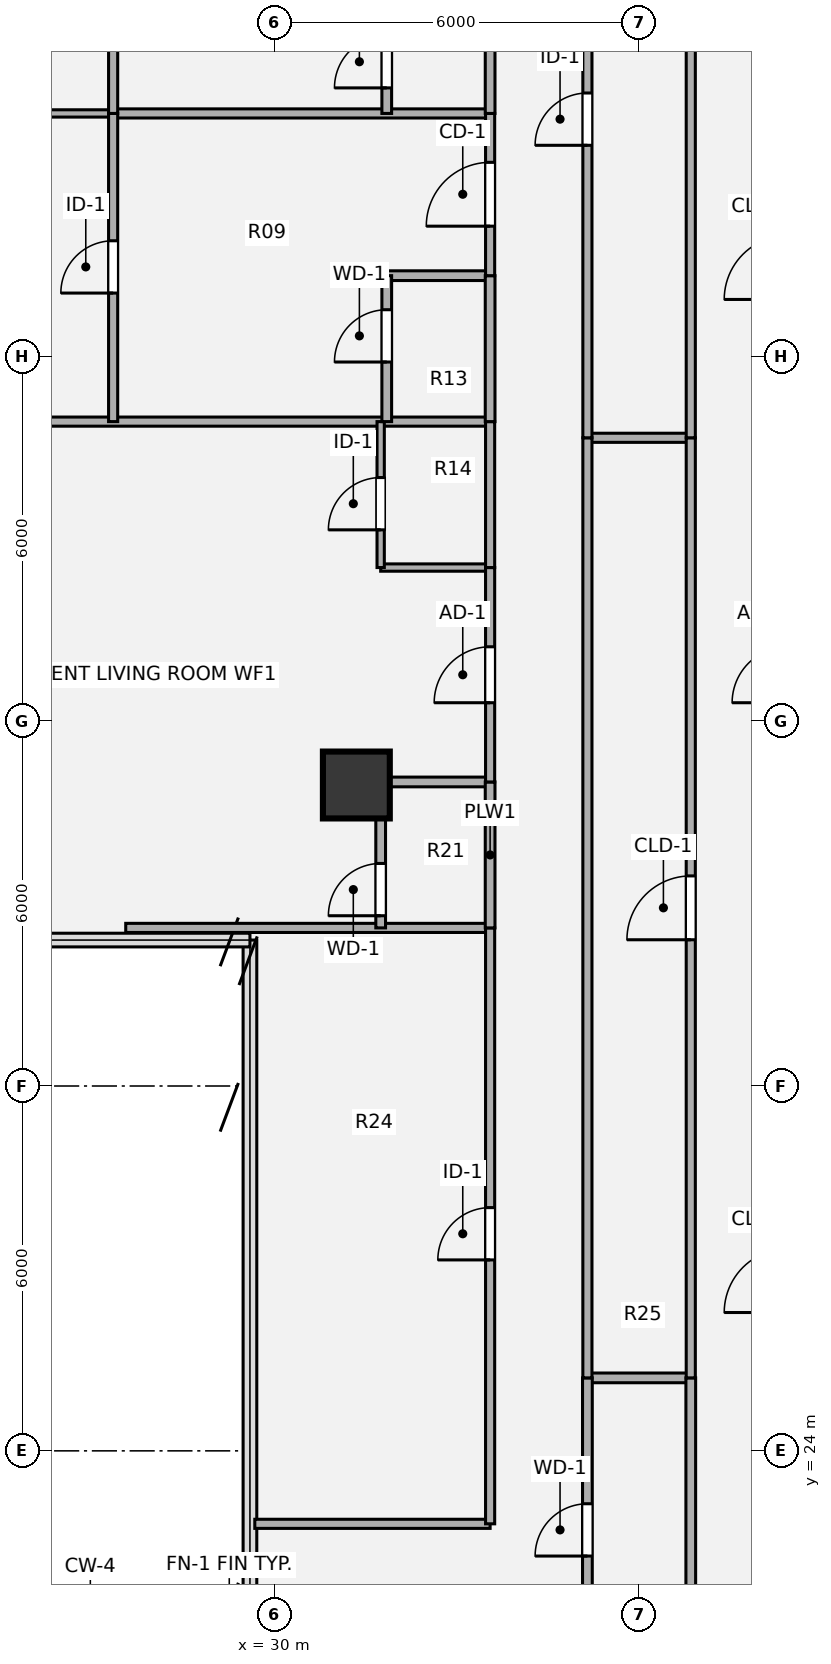
"""IFC4 building model, lengths in metres.
Left out: names, types, materials, properties, quantities, classifications, styles, units other than length and angle.
Written with IfcOpenShell. Run it as: python <this file> out.ifc"""

import sys

from ifc_helpers import new_model, si_unit, direction, frame, frame_2d, origin, origin_2d, place, context, subcontext, project, spatial, rectangle, hollow_circle, extrude, source, transform, mapped, element, fill, save


model = new_model("IFC4")
c1 = context("Model", 3, precision=1e-05, world=origin(), true_north=direction((0.0, 1.0)))
c2 = subcontext(c1, "Body", "Model", "MODEL_VIEW")
j1 = project(units=[si_unit("LENGTHUNIT", "METRE"), si_unit("PLANEANGLEUNIT", "RADIAN")], contexts=[c1])
p1 = place(None, origin())
s1 = spatial("IfcSite", under=j1, at=p1, CompositionType="ELEMENT")
p2 = place(p1, origin())
s2 = spatial("IfcBuilding", under=s1, at=p2, CompositionType="ELEMENT")
p3 = place(p2, frame((0.0, 0.0, 209.34)))
s3 = spatial("IfcBuildingStorey", under=s2, at=p3, CompositionType="ELEMENT", Elevation=209.34)
m1 = source(origin(), c2, "Body", "SweptSolid", [
    extrude(hollow_circle(Radius=0.55, WallThickness=0.04, at=origin_2d()), origin(), (0.0, 0.0, 1.0), 3.372),
])
p4 = place(p3, frame((31.35, 34.95, 0.0), z_axis=(0.0, 0.0, 1.0), x_axis=(1.0, 0.0, 0.0)))
e1 = element("IfcColumn", 1, at=p4, inside=s3, PredefinedType="COLUMN", context=c2, shape_type="MappedRepresentation", body=[
    mapped(m1, transform((0.0, 0.0, 0.0), x_axis=(1.0, 0.0, 0.0), y_axis=(0.0, 1.0, 0.0), z_axis=(0.0, 0.0, 1.0), scale=1.0)),
])
p5 = place(p3, frame((29.68, 22.8, 0.0), z_axis=(0.0, 0.0, 1.0), x_axis=(1.0, 0.0, 0.0)))
e2 = element("IfcWall", 2, at=p5, inside=s3, PredefinedType="PARTITIONING", context=c2, shape_type="SweptSolid", body=[
    extrude(rectangle(XDim=3.87, YDim=0.15, at=frame_2d((1.935, 0.0))), origin(), (0.0, 0.0, 1.0), 3.342),
])
p6 = place(p3, frame((35.15, 25.2, 0.0), z_axis=(0.0, 0.0, 1.0), x_axis=(1.0, 0.0, 0.0)))
e3 = element("IfcWall", 3, at=p6, inside=s3, PredefinedType="PLUMBINGWALL", context=c2, shape_type="SweptSolid", body=[
    extrude(rectangle(XDim=1.7, YDim=0.16, at=frame_2d((0.85, 0.0))), origin(), (0.0, 0.0, 1.0), 3.342),
])
p7 = place(p3, frame((27.557, 32.6, 0.0), z_axis=(0.0, 0.0, 1.0), x_axis=(1.0, 0.0, 0.0)))
e4 = element("IfcWall", 4, at=p7, inside=s3, PredefinedType="PARTITIONING", context=c2, shape_type="SweptSolid", body=[
    extrude(rectangle(XDim=5.993, YDim=0.15, at=frame_2d((2.997, 0.0))), origin(), (0.0, 0.0, 1.0), 3.342),
])
p8 = place(p3, frame((31.75, 35.0, 0.0), z_axis=(0.0, 0.0, 1.0), x_axis=(1.0, 0.0, 0.0)))
e5 = element("IfcWall", 5, at=p8, inside=s3, PredefinedType="PLUMBINGWALL", context=c2, shape_type="SweptSolid", body=[
    extrude(rectangle(XDim=1.8, YDim=0.16, at=frame_2d((0.9, 0.0))), origin(), (0.0, 0.0, 1.0), 1.857),
])
p9 = place(p3, frame((31.75, 38.526, 0.0), z_axis=(0.0, 0.0, 1.0), x_axis=(1.0, 0.0, 0.0)))
e6 = element("IfcWall", 6, at=p9, inside=s3, PredefinedType="PARTITIONING", context=c2, shape_type="SweptSolid", body=[
    extrude(rectangle(XDim=1.8, YDim=0.12, at=frame_2d((0.9, 0.0))), origin(), (0.0, 0.0, 1.0), 3.101),
])
p10 = place(p3, frame((35.15, 40.66, 0.0), z_axis=(0.0, 0.0, 1.0), x_axis=(1.0, 0.0, 0.0)))
e7 = element("IfcWall", 7, at=p10, inside=s3, PredefinedType="PARTITIONING", context=c2, shape_type="SweptSolid", body=[
    extrude(rectangle(XDim=1.7, YDim=0.15, at=frame_2d((0.85, 0.0))), origin(), (0.0, 0.0, 1.0), 3.101),
])
p11 = place(p3, frame((15.88, 40.926, 0.0), z_axis=(0.0, 0.0, 1.0), x_axis=(1.0, 0.0, 0.0)))
e8 = element("IfcWall", 8, at=p11, inside=s3, PredefinedType="PARTITIONING", context=c2, shape_type="SweptSolid", body=[
    extrude(rectangle(XDim=17.67, YDim=0.15, at=frame_2d((8.835, 0.0))), origin(), (0.0, 0.0, 1.0), 2.824),
])
p12 = place(p3, frame((31.85, 43.326, 0.0), z_axis=(0.0, 0.0, 1.0), x_axis=(1.0, 0.0, 0.0)))
e9 = element("IfcWall", 9, at=p12, inside=s3, PredefinedType="PLUMBINGWALL", context=c2, shape_type="SweptSolid", body=[
    extrude(rectangle(XDim=1.7, YDim=0.16, at=frame_2d((0.85, 0.0))), origin(), (0.0, 0.0, 1.0), 3.101),
])
p13 = place(p3, frame((15.88, 45.994, 0.0), z_axis=(0.0, 0.0, 1.0), x_axis=(1.0, 0.0, 0.0)))
e10 = element("IfcWall", 10, at=p13, inside=s3, PredefinedType="PARTITIONING", context=c2, shape_type="SweptSolid", body=[
    extrude(rectangle(XDim=11.47, YDim=0.12, at=frame_2d((5.735, 0.0))), origin(), (0.0, 0.0, 1.0), 2.457),
])
p14 = place(p3, frame((27.35, 45.994, 0.0), z_axis=(0.0, 0.0, 1.0), x_axis=(1.0, 0.0, 0.0)))
e11 = element("IfcWall", 11, at=p14, inside=s3, PredefinedType="PARTITIONING", context=c2, shape_type="SweptSolid", body=[
    extrude(rectangle(XDim=6.2, YDim=0.15, at=frame_2d((3.1, 0.0))), origin(), (0.0, 0.0, 1.0), 2.457),
])
p15 = place(p3, frame((27.35, 40.926, 0.0), z_axis=(0.0, 0.0, 1.0), x_axis=(0.0, 1.0, 0.0)))
e12 = element("IfcWall", 12, at=p15, inside=s3, PredefinedType="PARTITIONING", context=c2, shape_type="SweptSolid", body=[
    extrude(rectangle(XDim=5.068, YDim=0.15, at=frame_2d((2.534, 0.0))), origin(), (0.0, 0.0, 1.0), 3.342),
])
p16 = place(p15, frame((2.114, 0.0, 0.0)))
e13 = element("IfcOpeningElement", 13, at=p16, cuts=e12, PredefinedType="OPENING", context=c2, shape_type="SweptSolid", body=[
    extrude(rectangle(XDim=0.86, YDim=2.1, at=origin_2d()), frame((0.43, 0.085, 1.05), z_axis=(0.0, -1.0, 0.0), x_axis=(1.0, 0.0, 0.0)), (0.0, 0.0, 1.0), 0.17),
])
p17 = place(p3, frame((27.35, 45.994, 0.0), z_axis=(0.0, 0.0, 1.0), x_axis=(0.0, 1.0, 0.0)))
e14 = element("IfcWall", 14, at=p17, inside=s3, PredefinedType="PARTITIONING", context=c2, shape_type="SweptSolid", body=[
    extrude(rectangle(XDim=4.706, YDim=0.15, at=frame_2d((2.353, 0.0))), origin(), (0.0, 0.0, 1.0), 3.342),
])
p18 = place(p17, frame((1.546, 0.0, 0.0)))
e15 = element("IfcOpeningElement", 15, at=p18, cuts=e14, PredefinedType="OPENING", context=c2, shape_type="SweptSolid", body=[
    extrude(rectangle(XDim=0.86, YDim=2.1, at=origin_2d()), frame((0.43, 0.085, 1.05), z_axis=(0.0, -1.0, 0.0), x_axis=(1.0, 0.0, 0.0)), (0.0, 0.0, 1.0), 0.17),
])
p19 = place(p3, frame((31.75, 32.6, 0.0), z_axis=(0.0, 0.0, 1.0), x_axis=(0.0, 1.0, 0.0)))
e16 = element("IfcWall", 16, at=p19, inside=s3, PredefinedType="PLUMBINGWALL", context=c2, shape_type="SweptSolid", body=[
    extrude(rectangle(XDim=2.4, YDim=0.16, at=frame_2d((1.2, 0.0))), origin(), (0.0, 0.0, 1.0), 3.342),
])
p20 = place(p19, frame((0.2, 0.0, 0.0)))
e17 = element("IfcOpeningElement", 17, at=p20, cuts=e16, PredefinedType="OPENING", context=c2, shape_type="SweptSolid", body=[
    extrude(rectangle(XDim=0.86, YDim=2.1, at=origin_2d()), frame((0.43, 0.09, 1.05), z_axis=(0.0, -1.0, 0.0), x_axis=(1.0, 0.0, 0.0)), (0.0, 0.0, 1.0), 0.18),
])
p21 = place(p3, frame((31.75, 38.526, 0.0), z_axis=(0.0, 0.0, 1.0), x_axis=(0.0, 1.0, 0.0)))
e18 = element("IfcWall", 18, at=p21, inside=s3, PredefinedType="PARTITIONING", context=c2, shape_type="SweptSolid", body=[
    extrude(rectangle(XDim=2.4, YDim=0.12, at=frame_2d((1.2, 0.0))), origin(), (0.0, 0.0, 1.0), 3.342),
])
p22 = place(p21, frame((0.62, 0.0, 0.0)))
e19 = element("IfcOpeningElement", 19, at=p22, cuts=e18, PredefinedType="OPENING", context=c2, shape_type="SweptSolid", body=[
    extrude(rectangle(XDim=0.86, YDim=2.1, at=origin_2d()), frame((0.43, 0.07, 1.05), z_axis=(0.0, -1.0, 0.0), x_axis=(1.0, 0.0, 0.0)), (0.0, 0.0, 1.0), 0.14),
])
p23 = place(p3, frame((31.85, 40.926, 0.0), z_axis=(0.0, 0.0, 1.0), x_axis=(0.0, 1.0, 0.0)))
e20 = element("IfcWall", 20, at=p23, inside=s3, PredefinedType="PLUMBINGWALL", context=c2, shape_type="SweptSolid", body=[
    extrude(rectangle(XDim=2.4, YDim=0.16, at=frame_2d((1.2, 0.0))), origin(), (0.0, 0.0, 1.0), 3.342),
])
p24 = place(p23, frame((0.98, 0.0, 0.0)))
e21 = element("IfcOpeningElement", 21, at=p24, cuts=e20, PredefinedType="OPENING", context=c2, shape_type="SweptSolid", body=[
    extrude(rectangle(XDim=0.86, YDim=2.1, at=origin_2d()), frame((0.43, 0.09, 1.05), z_axis=(0.0, -1.0, 0.0), x_axis=(1.0, 0.0, 0.0)), (0.0, 0.0, 1.0), 0.18),
])
p25 = place(p3, frame((31.85, 45.994, 0.0), z_axis=(0.0, 0.0, 1.0), x_axis=(0.0, 1.0, 0.0)))
e22 = element("IfcWall", 22, at=p25, inside=s3, PredefinedType="PLUMBINGWALL", context=c2, shape_type="SweptSolid", body=[
    extrude(rectangle(XDim=2.4, YDim=0.16, at=frame_2d((1.2, 0.0))), origin(), (0.0, 0.0, 1.0), 3.342),
])
p26 = place(p25, frame((0.42, 0.0, 0.0)))
e23 = element("IfcOpeningElement", 23, at=p26, cuts=e22, PredefinedType="OPENING", context=c2, shape_type="SweptSolid", body=[
    extrude(rectangle(XDim=0.86, YDim=2.1, at=origin_2d()), frame((0.43, 0.09, 1.05), z_axis=(0.0, -1.0, 0.0), x_axis=(1.0, 0.0, 0.0)), (0.0, 0.0, 1.0), 0.18),
])
p27 = place(p3, frame((33.55, 22.8, 0.0), z_axis=(0.0, 0.0, 1.0), x_axis=(0.0, 1.0, 0.0)))
e24 = element("IfcWall", 24, at=p27, inside=s3, PredefinedType="PARTITIONING", context=c2, shape_type="SweptSolid", body=[
    extrude(rectangle(XDim=9.8, YDim=0.15, at=frame_2d((4.9, 0.0))), origin(), (0.0, 0.0, 1.0), 3.342),
])
p28 = place(p27, frame((4.34, 0.0, 0.0)))
e25 = element("IfcOpeningElement", 25, at=p28, cuts=e24, PredefinedType="OPENING", context=c2, shape_type="SweptSolid", body=[
    extrude(rectangle(XDim=0.86, YDim=2.1, at=origin_2d()), frame((0.43, 0.085, 1.05), z_axis=(0.0, -1.0, 0.0), x_axis=(1.0, 0.0, 0.0)), (0.0, 0.0, 1.0), 0.17),
])
p29 = place(p3, frame((33.55, 32.6, 0.0), z_axis=(0.0, 0.0, 1.0), x_axis=(0.0, 1.0, 0.0)))
e26 = element("IfcWall", 26, at=p29, inside=s3, PredefinedType="PLUMBINGWALL", context=c2, shape_type="SweptSolid", body=[
    extrude(rectangle(XDim=2.4, YDim=0.16, at=frame_2d((1.2, 0.0))), origin(), (0.0, 0.0, 1.0), 3.342),
])
p30 = place(p3, frame((33.55, 35.0, 0.0), z_axis=(0.0, 0.0, 1.0), x_axis=(0.0, 1.0, 0.0)))
e27 = element("IfcWall", 27, at=p30, inside=s3, PredefinedType="PARTITIONING", context=c2, shape_type="SweptSolid", body=[
    extrude(rectangle(XDim=3.526, YDim=0.15, at=frame_2d((1.763, 0.0))), origin(), (0.0, 0.0, 1.0), 3.342),
])
p31 = place(p30, frame((1.303, 0.0, 0.0)))
e28 = element("IfcOpeningElement", 28, at=p31, cuts=e27, PredefinedType="OPENING", context=c2, shape_type="SweptSolid", body=[
    extrude(rectangle(XDim=0.92, YDim=2.1, at=origin_2d()), frame((0.46, 0.085, 1.05), z_axis=(0.0, -1.0, 0.0), x_axis=(1.0, 0.0, 0.0)), (0.0, 0.0, 1.0), 0.17),
])
p32 = place(p3, frame((33.55, 38.526, 0.0), z_axis=(0.0, 0.0, 1.0), x_axis=(0.0, 1.0, 0.0)))
e29 = element("IfcWall", 29, at=p32, inside=s3, PredefinedType="PARTITIONING", context=c2, shape_type="SweptSolid", body=[
    extrude(rectangle(XDim=2.4, YDim=0.15, at=frame_2d((1.2, 0.0))), origin(), (0.0, 0.0, 1.0), 3.342),
])
p33 = place(p3, frame((33.55, 40.926, 0.0), z_axis=(0.0, 0.0, 1.0), x_axis=(0.0, 1.0, 0.0)))
e30 = element("IfcWall", 30, at=p33, inside=s3, PredefinedType="PLUMBINGWALL", context=c2, shape_type="SweptSolid", body=[
    extrude(rectangle(XDim=2.4, YDim=0.16, at=frame_2d((1.2, 0.0))), origin(), (0.0, 0.0, 1.0), 3.342),
])
p34 = place(p3, frame((33.55, 43.326, 0.0), z_axis=(0.0, 0.0, 1.0), x_axis=(0.0, 1.0, 0.0)))
e31 = element("IfcWall", 31, at=p34, inside=s3, PredefinedType="PARTITIONING", context=c2, shape_type="SweptSolid", body=[
    extrude(rectangle(XDim=2.668, YDim=0.15, at=frame_2d((1.334, 0.0))), origin(), (0.0, 0.0, 1.0), 3.342),
])
p35 = place(p34, frame((0.814, 0.0, 0.0)))
e32 = element("IfcOpeningElement", 32, at=p35, cuts=e31, PredefinedType="OPENING", context=c2, shape_type="SweptSolid", body=[
    extrude(rectangle(XDim=1.05, YDim=2.1, at=origin_2d()), frame((0.525, 0.085, 1.05), z_axis=(0.0, -1.0, 0.0), x_axis=(1.0, 0.0, 0.0)), (0.0, 0.0, 1.0), 0.17),
])
p36 = place(p3, frame((33.55, 45.994, 0.0), z_axis=(0.0, 0.0, 1.0), x_axis=(0.0, 1.0, 0.0)))
e33 = element("IfcWall", 33, at=p36, inside=s3, PredefinedType="PLUMBINGWALL", context=c2, shape_type="SweptSolid", body=[
    extrude(rectangle(XDim=2.4, YDim=0.16, at=frame_2d((1.2, 0.0))), origin(), (0.0, 0.0, 1.0), 3.342),
])
p37 = place(p3, frame((35.15, 20.2, 0.0), z_axis=(0.0, 0.0, 1.0), x_axis=(0.0, 1.0, 0.0)))
e34 = element("IfcWall", 34, at=p37, inside=s3, PredefinedType="PLUMBINGWALL", context=c2, shape_type="SweptSolid", body=[
    extrude(rectangle(XDim=5.0, YDim=0.16, at=frame_2d((2.5, 0.0))), origin(), (0.0, 0.0, 1.0), 3.342),
])
p38 = place(p37, frame((2.07, 0.0, 0.0)))
e35 = element("IfcOpeningElement", 35, at=p38, cuts=e34, PredefinedType="OPENING", context=c2, shape_type="SweptSolid", body=[
    extrude(rectangle(XDim=0.86, YDim=2.1, at=origin_2d()), frame((0.43, 0.09, 1.05), z_axis=(0.0, -1.0, 0.0), x_axis=(1.0, 0.0, 0.0)), (0.0, 0.0, 1.0), 0.18),
])
p39 = place(p3, frame((35.15, 25.2, 0.0), z_axis=(0.0, 0.0, 1.0), x_axis=(0.0, 1.0, 0.0)))
e36 = element("IfcWall", 36, at=p39, inside=s3, PredefinedType="PARTITIONING", context=c2, shape_type="SweptSolid", body=[
    extrude(rectangle(XDim=15.46, YDim=0.15, at=frame_2d((7.73, 0.0))), origin(), (0.0, 0.0, 1.0), 3.342),
])
p40 = place(p3, frame((35.15, 40.66, 0.0), z_axis=(0.0, 0.0, 1.0), x_axis=(0.0, 1.0, 0.0)))
e37 = element("IfcWall", 37, at=p40, inside=s3, PredefinedType="PARTITIONING", context=c2, shape_type="SweptSolid", body=[
    extrude(rectangle(XDim=10.54, YDim=0.15, at=frame_2d((5.27, 0.0))), origin(), (0.0, 0.0, 1.0), 3.342),
])
p41 = place(p40, frame((4.81, 0.0, 0.0)))
e38 = element("IfcOpeningElement", 38, at=p41, cuts=e37, PredefinedType="OPENING", context=c2, shape_type="SweptSolid", body=[
    extrude(rectangle(XDim=0.86, YDim=2.1, at=origin_2d()), frame((0.43, 0.085, 1.05), z_axis=(0.0, -1.0, 0.0), x_axis=(1.0, 0.0, 0.0)), (0.0, 0.0, 1.0), 0.17),
])
p42 = place(p3, frame((36.85, 20.2, 0.0), z_axis=(0.0, 0.0, 1.0), x_axis=(0.0, 1.0, 0.0)))
e39 = element("IfcWall", 39, at=p42, inside=s3, PredefinedType="PLUMBINGWALL", context=c2, shape_type="SweptSolid", body=[
    extrude(rectangle(XDim=5.0, YDim=0.16, at=frame_2d((2.5, 0.0))), origin(), (0.0, 0.0, 1.0), 3.342),
])
p43 = place(p3, frame((36.85, 25.2, 0.0), z_axis=(0.0, 0.0, 1.0), x_axis=(0.0, 1.0, 0.0)))
e40 = element("IfcWall", 40, at=p43, inside=s3, PredefinedType="PARTITIONING", context=c2, shape_type="SweptSolid", body=[
    extrude(rectangle(XDim=15.46, YDim=0.15, at=frame_2d((7.73, 0.0))), origin(), (0.0, 0.0, 1.0), 3.342),
])
p44 = place(p43, frame((7.205, 0.0, 0.0)))
e41 = element("IfcOpeningElement", 41, at=p44, cuts=e40, PredefinedType="OPENING", context=c2, shape_type="SweptSolid", body=[
    extrude(rectangle(XDim=1.05, YDim=2.1, at=origin_2d()), frame((0.525, 0.085, 1.05), z_axis=(0.0, -1.0, 0.0), x_axis=(1.0, 0.0, 0.0)), (0.0, 0.0, 1.0), 0.17),
])
p45 = place(p3, frame((36.85, 40.66, 0.0), z_axis=(0.0, 0.0, 1.0), x_axis=(0.0, 1.0, 0.0)))
e42 = element("IfcWall", 42, at=p45, inside=s3, PredefinedType="PARTITIONING", context=c2, shape_type="SweptSolid", body=[
    extrude(rectangle(XDim=10.54, YDim=0.15, at=frame_2d((5.27, 0.0))), origin(), (0.0, 0.0, 1.0), 3.342),
])
m2 = source(origin(), c2, "Body", "SweptSolid", [
    extrude(rectangle(XDim=0.86, YDim=2.1, at=origin_2d()), frame((0.43, 0.025, 1.05), z_axis=(0.0, -1.0, 0.0), x_axis=(1.0, 0.0, 0.0)), (0.0, 0.0, 1.0), 0.05),
])
p46 = place(p16, origin())
e43 = element("IfcDoor", 43, at=p46, inside=s3, OperationType="SINGLE_SWING_LEFT", PredefinedType="DOOR", context=c2, shape_type="MappedRepresentation", body=[
    mapped(m2, transform((0.0, 0.0, 0.0), x_axis=(1.0, 0.0, 0.0), y_axis=(0.0, 1.0, 0.0), z_axis=(0.0, 0.0, 1.0), scale=1.0)),
])
fill(e13, e43)
m3 = source(origin(), c2, "Body", "SweptSolid", [
    extrude(rectangle(XDim=0.86, YDim=2.1, at=origin_2d()), frame((0.43, 0.025, 1.05), z_axis=(0.0, -1.0, 0.0), x_axis=(1.0, 0.0, 0.0)), (0.0, 0.0, 1.0), 0.05),
])
p47 = place(p20, origin())
e44 = element("IfcDoor", 44, at=p47, inside=s3, OperationType="SINGLE_SWING_LEFT", PredefinedType="DOOR", context=c2, shape_type="MappedRepresentation", body=[
    mapped(m3, transform((0.0, 0.0, 0.0), x_axis=(1.0, 0.0, 0.0), y_axis=(0.0, 1.0, 0.0), z_axis=(0.0, 0.0, 1.0), scale=1.0)),
])
fill(e17, e44)
p48 = place(p22, origin())
e45 = element("IfcDoor", 45, at=p48, inside=s3, OperationType="SINGLE_SWING_LEFT", PredefinedType="DOOR", context=c2, shape_type="MappedRepresentation", body=[
    mapped(m2, transform((0.0, 0.0, 0.0), x_axis=(1.0, 0.0, 0.0), y_axis=(0.0, 1.0, 0.0), z_axis=(0.0, 0.0, 1.0), scale=1.0)),
])
fill(e19, e45)
p49 = place(p24, origin())
e46 = element("IfcDoor", 46, at=p49, inside=s3, OperationType="SINGLE_SWING_LEFT", PredefinedType="DOOR", context=c2, shape_type="MappedRepresentation", body=[
    mapped(m3, transform((0.0, 0.0, 0.0), x_axis=(1.0, 0.0, 0.0), y_axis=(0.0, 1.0, 0.0), z_axis=(0.0, 0.0, 1.0), scale=1.0)),
])
fill(e21, e46)
p50 = place(p26, origin())
e47 = element("IfcDoor", 47, at=p50, inside=s3, OperationType="SINGLE_SWING_LEFT", PredefinedType="DOOR", context=c2, shape_type="MappedRepresentation", body=[
    mapped(m3, transform((0.0, 0.0, 0.0), x_axis=(1.0, 0.0, 0.0), y_axis=(0.0, 1.0, 0.0), z_axis=(0.0, 0.0, 1.0), scale=1.0)),
])
fill(e23, e47)
p51 = place(p28, origin())
e48 = element("IfcDoor", 48, at=p51, inside=s3, OperationType="SINGLE_SWING_LEFT", PredefinedType="DOOR", context=c2, shape_type="MappedRepresentation", body=[
    mapped(m2, transform((0.0, 0.0, 0.0), x_axis=(1.0, 0.0, 0.0), y_axis=(0.0, 1.0, 0.0), z_axis=(0.0, 0.0, 1.0), scale=1.0)),
])
fill(e25, e48)
m4 = source(origin(), c2, "Body", "SweptSolid", [
    extrude(rectangle(XDim=0.92, YDim=2.1, at=origin_2d()), frame((0.46, 0.025, 1.05), z_axis=(0.0, -1.0, 0.0), x_axis=(1.0, 0.0, 0.0)), (0.0, 0.0, 1.0), 0.05),
])
p52 = place(p31, origin())
e49 = element("IfcDoor", 49, at=p52, inside=s3, OperationType="SINGLE_SWING_LEFT", PredefinedType="DOOR", context=c2, shape_type="MappedRepresentation", body=[
    mapped(m4, transform((0.0, 0.0, 0.0), x_axis=(1.0, 0.0, 0.0), y_axis=(0.0, 1.0, 0.0), z_axis=(0.0, 0.0, 1.0), scale=1.0)),
])
fill(e28, e49)
m5 = source(origin(), c2, "Body", "SweptSolid", [
    extrude(rectangle(XDim=1.05, YDim=2.1, at=origin_2d()), frame((0.525, 0.025, 1.05), z_axis=(0.0, -1.0, 0.0), x_axis=(1.0, 0.0, 0.0)), (0.0, 0.0, 1.0), 0.05),
])
p53 = place(p35, origin())
e50 = element("IfcDoor", 50, at=p53, inside=s3, OperationType="SINGLE_SWING_LEFT", PredefinedType="DOOR", context=c2, shape_type="MappedRepresentation", body=[
    mapped(m5, transform((0.0, 0.0, 0.0), x_axis=(1.0, 0.0, 0.0), y_axis=(0.0, 1.0, 0.0), z_axis=(0.0, 0.0, 1.0), scale=1.0)),
])
fill(e32, e50)
p54 = place(p38, origin())
e51 = element("IfcDoor", 51, at=p54, inside=s3, OperationType="SINGLE_SWING_LEFT", PredefinedType="DOOR", context=c2, shape_type="MappedRepresentation", body=[
    mapped(m3, transform((0.0, 0.0, 0.0), x_axis=(1.0, 0.0, 0.0), y_axis=(0.0, 1.0, 0.0), z_axis=(0.0, 0.0, 1.0), scale=1.0)),
])
fill(e35, e51)
p55 = place(p41, origin())
e52 = element("IfcDoor", 52, at=p55, inside=s3, OperationType="SINGLE_SWING_LEFT", PredefinedType="DOOR", context=c2, shape_type="MappedRepresentation", body=[
    mapped(m2, transform((0.0, 0.0, 0.0), x_axis=(1.0, 0.0, 0.0), y_axis=(0.0, 1.0, 0.0), z_axis=(0.0, 0.0, 1.0), scale=1.0)),
])
fill(e38, e52)
m6 = source(origin(), c2, "Body", "SweptSolid", [
    extrude(rectangle(XDim=1.05, YDim=2.1, at=origin_2d()), frame((0.525, 0.025, 1.05), z_axis=(0.0, -1.0, 0.0), x_axis=(1.0, 0.0, 0.0)), (0.0, 0.0, 1.0), 0.05),
])
p56 = place(p44, origin())
e53 = element("IfcDoor", 53, at=p56, inside=s3, OperationType="SINGLE_SWING_LEFT", PredefinedType="DOOR", context=c2, shape_type="MappedRepresentation", body=[
    mapped(m6, transform((0.0, 0.0, 0.0), x_axis=(1.0, 0.0, 0.0), y_axis=(0.0, 1.0, 0.0), z_axis=(0.0, 0.0, 1.0), scale=1.0)),
])
fill(e41, e53)
save(model, sys.argv[1])
